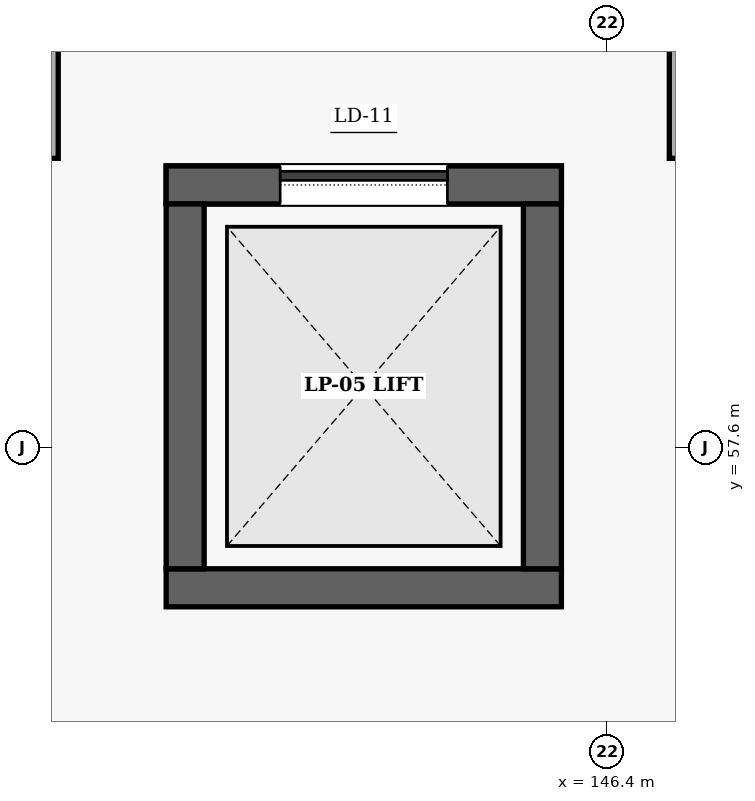
"""IFC4 building model, lengths in metres.
Left out: names, types, materials, properties, quantities, classifications, styles, units other than length and angle.
Written with IfcOpenShell. Run it as: python <this file> out.ifc"""

import sys

from ifc_helpers import new_model, si_unit, direction, frame, frame_2d, origin, place, context, subcontext, project, spatial, rectangle, extrude, element, fill, save


model = new_model("IFC4")
c1 = context("Model", 3, precision=1e-05, world=origin(), true_north=direction((0.0, 1.0)))
c2 = subcontext(c1, "Body", "Model", "MODEL_VIEW")
j1 = project(units=[si_unit("LENGTHUNIT", "METRE"), si_unit("PLANEANGLEUNIT", "RADIAN")], contexts=[c1])
p1 = place(None, origin())
s1 = spatial("IfcSite", under=j1, at=p1, CompositionType="ELEMENT")
p2 = place(p1, origin())
s2 = spatial("IfcBuilding", under=s1, at=p2, CompositionType="ELEMENT")
p3 = place(p2, origin())
s3 = spatial("IfcBuildingStorey", under=s2, at=p3, CompositionType="ELEMENT", Elevation=0.0)
p4 = place(p3, frame((143.5, 59.325, -1.65), z_axis=(0.0, 0.0, 1.0), x_axis=(1.0, 0.0, 0.0)))
e1 = element("IfcWall", 1, at=p4, inside=s3, PredefinedType="SHEAR", context=c2, shape_type="SweptSolid", body=[
    extrude(rectangle(XDim=2.6, YDim=0.25, at=frame_2d((1.3, 0.0))), origin(), (0.0, 0.0, 1.0), 1.31),
])
p5 = place(p3, frame((143.5, 56.675, -1.65), z_axis=(0.0, 0.0, 1.0), x_axis=(1.0, 0.0, 0.0)))
e2 = element("IfcWall", 2, at=p5, inside=s3, PredefinedType="SHEAR", context=c2, shape_type="SweptSolid", body=[
    extrude(rectangle(XDim=2.6, YDim=0.25, at=frame_2d((1.3, 0.0))), origin(), (0.0, 0.0, 1.0), 6.77),
])
p6 = place(p3, frame((143.5, 59.325, 0.0), z_axis=(0.0, 0.0, 1.0), x_axis=(1.0, 0.0, 0.0)))
e3 = element("IfcWall", 3, at=p6, inside=s3, PredefinedType="SHEAR", context=c2, shape_type="SweptSolid", body=[
    extrude(rectangle(XDim=2.6, YDim=0.25, at=frame_2d((1.3, 0.0))), origin(), (0.0, 0.0, 1.0), 5.12),
])
p7 = place(p6, frame((0.75, 0.0, 0.0)))
e4 = element("IfcOpeningElement", 4, at=p7, cuts=e3, PredefinedType="OPENING", context=c2, shape_type="SweptSolid", body=[
    extrude(rectangle(XDim=1.1, YDim=2.15, at=frame_2d((0.55, 1.075))), frame((0.0, 0.135, 0.0), z_axis=(0.0, -1.0, 0.0), x_axis=(1.0, 0.0, 0.0)), (0.0, 0.0, 1.0), 0.27),
])
for number, where, z_axis, x_axis in (
    (5, (143.625, 56.8, -1.65), (0.0, 0.0, 1.0), (0.0, 1.0, 0.0)),
    (6, (145.975, 56.8, -1.65), (0.0, 0.0, 1.0), (0.0, 1.0, 0.0)),
):
    element("IfcWall", number, at=place(p3, frame(where, z_axis=z_axis, x_axis=x_axis)), inside=s3, PredefinedType="SHEAR", context=c2, shape_type="SweptSolid", body=[
        extrude(rectangle(XDim=2.4, YDim=0.25, at=frame_2d((1.2, 0.0))), origin(), (0.0, 0.0, 1.0), 6.77),
    ])
for number, where, z_axis, x_axis in (
    (7, (142.7, 59.5, 0.0), (0.0, 0.0, 1.0), (0.0, 1.0, 0.0)),
    (8, (146.9, 59.5, 0.0), (0.0, 0.0, 1.0), (0.0, 1.0, 0.0)),
):
    element("IfcWall", number, at=place(p3, frame(where, z_axis=z_axis, x_axis=x_axis)), inside=s3, PredefinedType="PARTITIONING", context=c2, shape_type="SweptSolid", body=[
        extrude(rectangle(XDim=3.05, YDim=0.18, at=frame_2d((1.525, 0.0))), origin(), (0.0, 0.0, 1.0), 5.12),
    ])
p8 = place(p7, origin())
e9 = element("IfcDoor", 9, at=p8, inside=s3, OperationType="SLIDING_TO_RIGHT", PredefinedType="DOOR", context=c2, shape_type="SweptSolid", body=[
    extrude(rectangle(XDim=1.1, YDim=2.15, at=frame_2d((0.55, 1.075))), frame((0.0, 0.025, 0.0), z_axis=(0.0, -1.0, 0.0), x_axis=(1.0, 0.0, 0.0)), (0.0, 0.0, 1.0), 0.05),
])
fill(e4, e9)
save(model, sys.argv[1])
